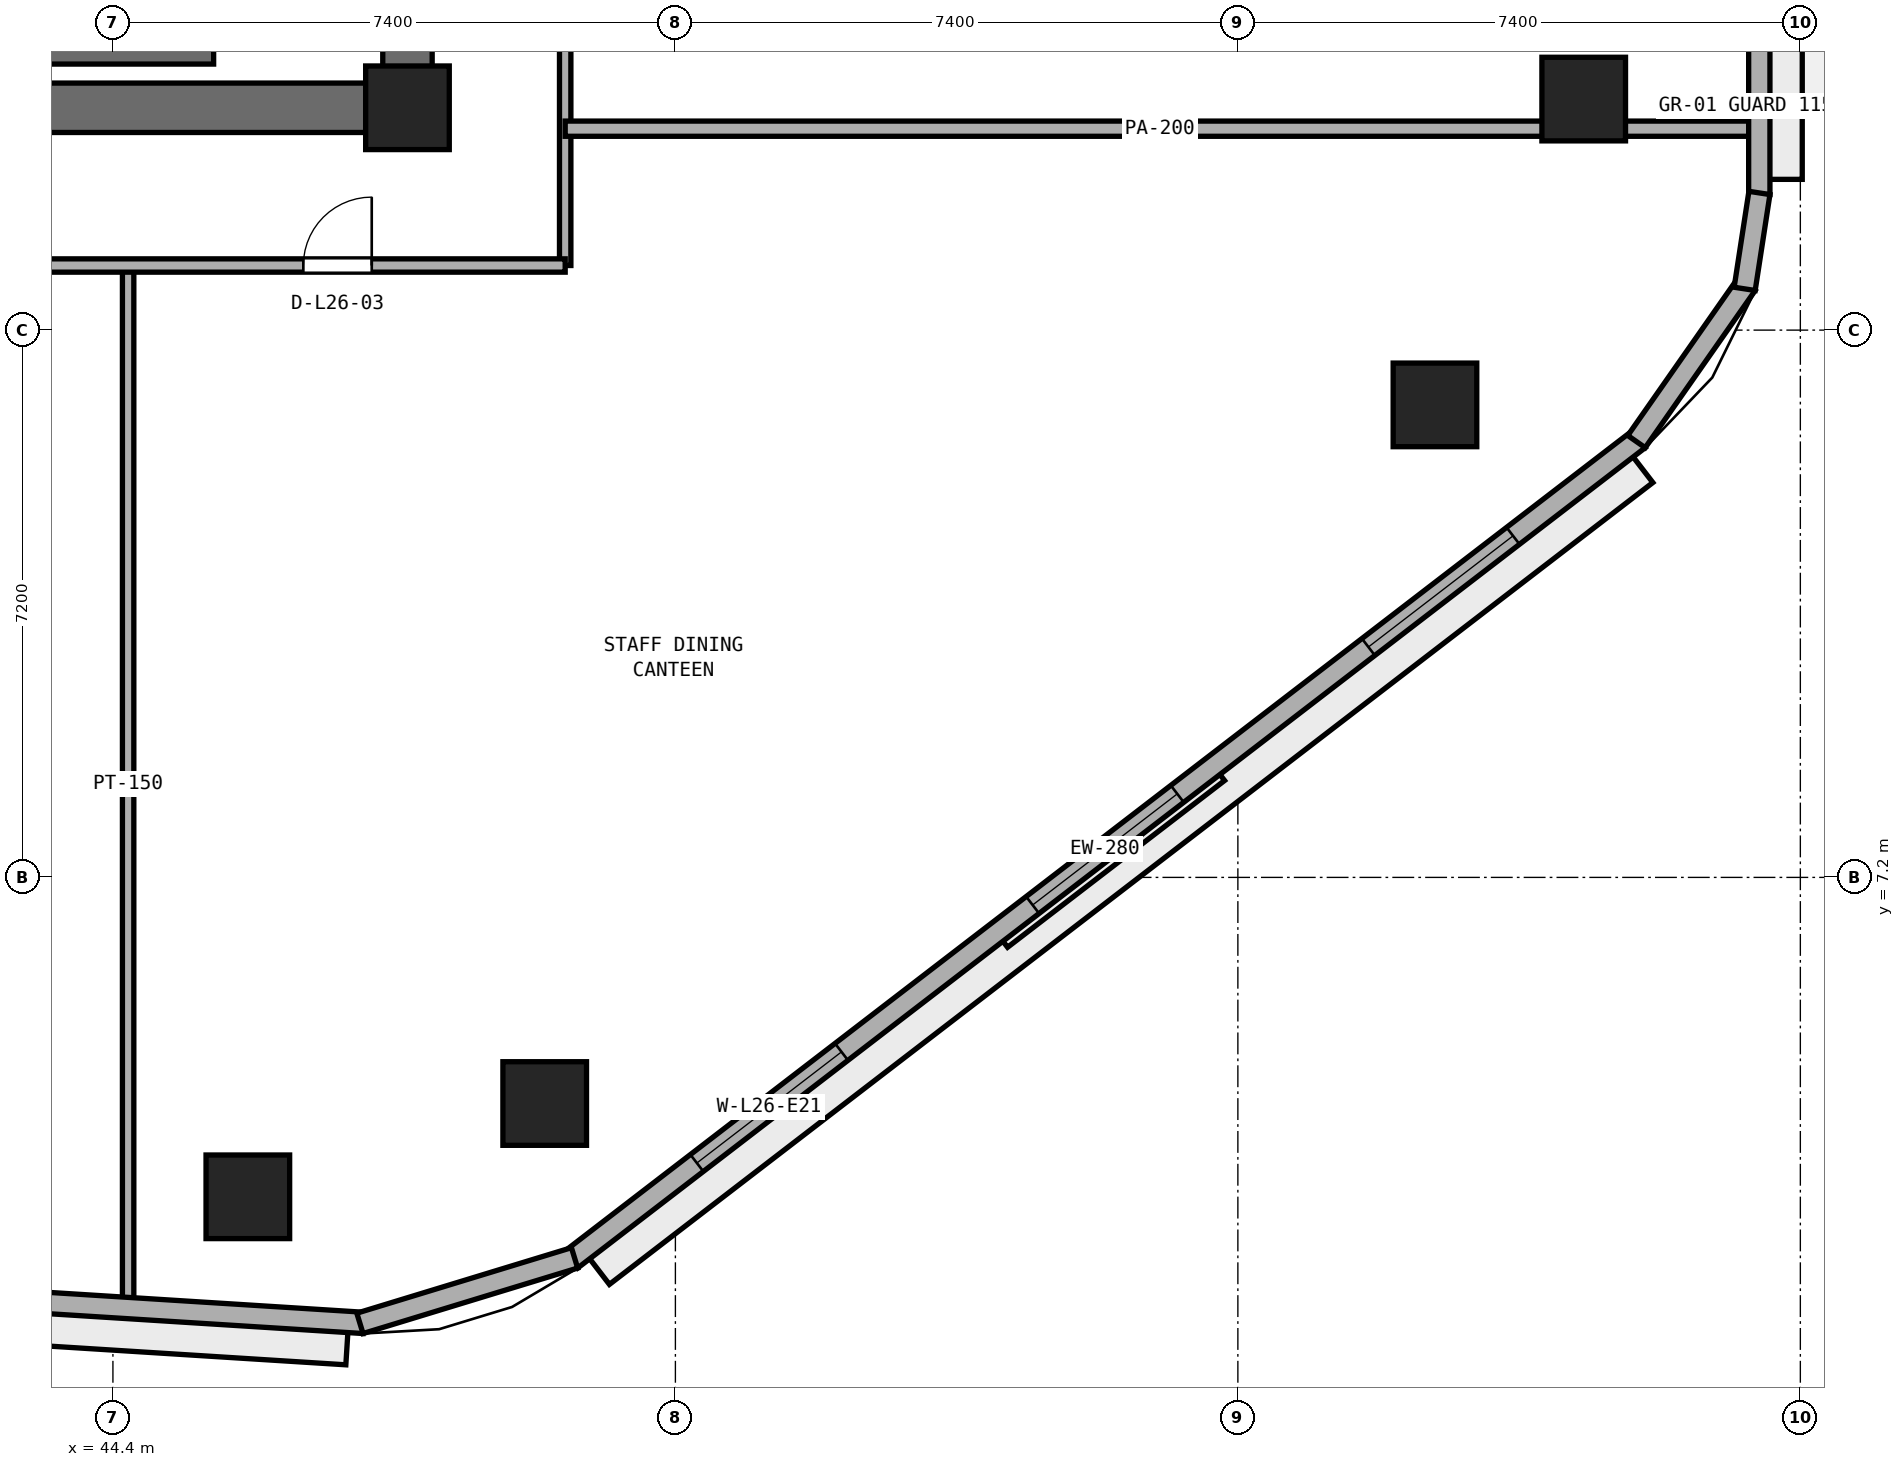
"""IFC4 building model, lengths in metres.
Left out: names, types, materials, properties, quantities, classifications, styles, units other than length and angle.
Written with IfcOpenShell. Run it as: python <this file> out.ifc"""

import sys

from ifc_helpers import new_model, si_unit, direction, frame, frame_2d, origin, origin_2d, place, context, subcontext, project, spatial, rectangle, extrude, element, fill, save


model = new_model("IFC4")
c1 = context("Model", 3, precision=1e-05, world=origin(), true_north=direction((0.0, 1.0)))
c2 = subcontext(c1, "Body", "Model", "MODEL_VIEW")
j1 = project(units=[si_unit("LENGTHUNIT", "METRE"), si_unit("PLANEANGLEUNIT", "RADIAN")], contexts=[c1])
p1 = place(None, origin())
s1 = spatial("IfcSite", under=j1, at=p1, CompositionType="ELEMENT")
p2 = place(p1, origin())
s2 = spatial("IfcBuilding", under=s1, at=p2, CompositionType="ELEMENT")
p3 = place(p2, frame((0.0, 0.0, 104.8)))
s3 = spatial("IfcBuildingStorey", under=s2, at=p3, CompositionType="ELEMENT", Elevation=104.8)
p4 = place(p3, frame((25.4, 17.325, 0.0), z_axis=(0.0, 0.0, 1.0), x_axis=(1.0, 0.0, 0.0)))
e1 = element("IfcWall", 1, at=p4, inside=s3, PredefinedType="SHEAR", context=c2, shape_type="SweptSolid", body=[
    extrude(rectangle(XDim=23.2, YDim=0.65, at=frame_2d((11.6, 0.0))), origin(), (0.0, 0.0, 1.0), 3.525),
])
p5 = place(p3, frame((48.275, 17.65, 0.0), z_axis=(0.0, 0.0, 1.0), x_axis=(0.0, 1.0, 0.0)))
e2 = element("IfcWall", 2, at=p5, inside=s3, PredefinedType="SHEAR", context=c2, shape_type="SweptSolid", body=[
    extrude(rectangle(XDim=15.1, YDim=0.65, at=frame_2d((7.55, 0.0))), origin(), (0.0, 0.0, 1.0), 3.525),
])
p6 = place(p5, frame((5.65, 0.0, 0.0)))
e3 = element("IfcOpeningElement", 3, at=p6, cuts=e2, PredefinedType="OPENING", context=c2, shape_type="SweptSolid", body=[
    extrude(rectangle(XDim=1.5, YDim=2.15, at=frame_2d((0.75, 1.075))), frame((0.0, 0.335, 0.0), z_axis=(0.0, -1.0, 0.0), x_axis=(1.0, 0.0, 0.0)), (0.0, 0.0, 1.0), 0.67),
])
p7 = place(p3, frame((48.275, 17.325, 0.0), z_axis=(0.0, 0.0, 1.0), x_axis=(1.0, 0.0, 0.0)))
e4 = element("IfcColumn", 4, at=p7, inside=s3, PredefinedType="PILASTER", context=c2, shape_type="SweptSolid", body=[
    extrude(rectangle(XDim=1.1, YDim=1.1, at=origin_2d()), origin(), (0.0, 0.0, 1.0), 3.8),
])
for number, where, z_axis, x_axis in (
    (5, (46.175, 2.998, 0.0), (0.0, 0.0, 1.0), (1.0, 0.0, 0.0)),
    (6, (50.081, 4.225, 0.0), (0.0, 0.0, 1.0), (1.0, 0.0, 0.0)),
    (7, (61.793, 13.416, 0.0), (0.0, 0.0, 1.0), (1.0, 0.0, 0.0)),
    (8, (63.75, 17.44, 0.0), (0.0, 0.0, 1.0), (1.0, 0.0, 0.0)),
):
    element("IfcColumn", number, at=place(p3, frame(where, z_axis=z_axis, x_axis=x_axis)), inside=s3, PredefinedType="COLUMN", context=c2, shape_type="SweptSolid", body=[
        extrude(rectangle(XDim=1.1, YDim=1.1, at=origin_2d()), origin(), (0.0, 0.0, 1.0), 3.8),
    ])
p8 = place(p3, frame((38.425, 18.025, 0.0), z_axis=(0.0, 0.0, 1.0), x_axis=(1.0, 0.0, 0.0)))
e9 = element("IfcWall", 9, at=p8, inside=s3, PredefinedType="SHEAR", context=c2, shape_type="SweptSolid", body=[
    extrude(rectangle(XDim=7.3, YDim=0.25, at=frame_2d((3.65, 0.0))), origin(), (0.0, 0.0, 1.0), 3.525),
])
p9 = place(p3, frame((50.35, 15.25, 0.0), z_axis=(0.0, 0.0, 1.0), x_axis=(0.0, 1.0, 0.0)))
e10 = element("IfcWall", 10, at=p9, inside=s3, PredefinedType="PARTITIONING", context=c2, shape_type="SweptSolid", body=[
    extrude(rectangle(XDim=19.9, YDim=0.15, at=frame_2d((9.95, 0.0))), origin(), (0.0, 0.0, 1.0), 3.525),
])
p10 = place(p9, frame((7.825, 0.0, 0.0)))
e11 = element("IfcOpeningElement", 11, at=p10, cuts=e10, PredefinedType="OPENING", context=c2, shape_type="SweptSolid", body=[
    extrude(rectangle(XDim=0.9, YDim=2.1, at=frame_2d((0.45, 1.05))), frame((0.0, 0.085, 0.0), z_axis=(0.0, -1.0, 0.0), x_axis=(1.0, 0.0, 0.0)), (0.0, 0.0, 1.0), 0.17),
])
p11 = place(p9, frame((15.925, 0.0, 0.0)))
e12 = element("IfcOpeningElement", 12, at=p11, cuts=e10, PredefinedType="OPENING", context=c2, shape_type="SweptSolid", body=[
    extrude(rectangle(XDim=1.0, YDim=2.12, at=frame_2d((0.5, 1.06))), frame((0.0, 0.085, 0.0), z_axis=(0.0, -1.0, 0.0), x_axis=(1.0, 0.0, 0.0)), (0.0, 0.0, 1.0), 0.17),
])
p12 = place(p3, frame((44.6, 1.599, 0.0), z_axis=(0.0, 0.0, 1.0), x_axis=(0.0, 1.0, 0.0)))
e13 = element("IfcWall", 13, at=p12, inside=s3, PredefinedType="PARTITIONING", context=c2, shape_type="SweptSolid", body=[
    extrude(rectangle(XDim=13.651, YDim=0.15, at=frame_2d((6.825, 0.0))), origin(), (0.0, 0.0, 1.0), 3.525),
])
p13 = place(p3, frame((23.65, 15.25, 0.0), z_axis=(0.0, 0.0, 1.0), x_axis=(1.0, 0.0, 0.0)))
e14 = element("IfcWall", 14, at=p13, inside=s3, PredefinedType="PARTITIONING", context=c2, shape_type="SweptSolid", body=[
    extrude(rectangle(XDim=26.7, YDim=0.175, at=frame_2d((13.35, 0.0))), origin(), (0.0, 0.0, 1.0), 3.525),
])
p14 = place(p13, frame((10.145, 0.0, 0.0)))
e15 = element("IfcOpeningElement", 15, at=p14, cuts=e14, PredefinedType="OPENING", context=c2, shape_type="SweptSolid", body=[
    extrude(rectangle(XDim=0.9, YDim=2.1, at=frame_2d((0.45, 1.05))), frame((0.0, 0.097, 0.0), z_axis=(0.0, -1.0, 0.0), x_axis=(1.0, 0.0, 0.0)), (0.0, 0.0, 1.0), 0.195),
])
p15 = place(p13, frame((23.255, 0.0, 0.0)))
e16 = element("IfcOpeningElement", 16, at=p15, cuts=e14, PredefinedType="OPENING", context=c2, shape_type="SweptSolid", body=[
    extrude(rectangle(XDim=0.9, YDim=2.1, at=frame_2d((0.45, 1.05))), frame((0.0, 0.097, 0.0), z_axis=(0.0, -1.0, 0.0), x_axis=(1.0, 0.0, 0.0)), (0.0, 0.0, 1.0), 0.195),
])
p16 = place(p3, frame((50.35, 17.05, 0.0), z_axis=(0.0, 0.0, 1.0), x_axis=(1.0, 0.0, 0.0)))
e17 = element("IfcWall", 17, at=p16, inside=s3, PredefinedType="PARTITIONING", context=c2, shape_type="SweptSolid", body=[
    extrude(rectangle(XDim=15.645, YDim=0.2, at=frame_2d((7.823, 0.0))), origin(), (0.0, 0.0, 1.0), 3.525),
])
p17 = place(p3, frame((28.161, 2.571, 0.0), z_axis=(0.0, 0.0, 1.0), x_axis=(0.998017288298, -0.06294038654, 0.0)))
e18 = element("IfcWall", 18, at=p17, inside=s3, PredefinedType="STANDARD", context=c2, shape_type="SweptSolid", body=[
    extrude(rectangle(XDim=19.577, YDim=0.28, at=frame_2d((9.789, 0.0))), origin(), (0.0, 0.0, 1.0), 3.525),
])
p18 = place(p17, frame((2.396, 0.0, 0.9)))
e19 = element("IfcOpeningElement", 19, at=p18, cuts=e18, PredefinedType="OPENING", context=c2, shape_type="SweptSolid", body=[
    extrude(rectangle(XDim=2.4, YDim=1.75, at=frame_2d((1.2, 0.875))), frame((0.0, 0.15, 0.0), z_axis=(0.0, -1.0, 0.0), x_axis=(1.0, 0.0, 0.0)), (0.0, 0.0, 1.0), 0.3),
])
p19 = place(p17, frame((8.588, 0.0, 0.9)))
e20 = element("IfcOpeningElement", 20, at=p19, cuts=e18, PredefinedType="OPENING", context=c2, shape_type="SweptSolid", body=[
    extrude(rectangle(XDim=2.4, YDim=1.75, at=frame_2d((1.2, 0.875))), frame((0.0, 0.15, 0.0), z_axis=(0.0, -1.0, 0.0), x_axis=(1.0, 0.0, 0.0)), (0.0, 0.0, 1.0), 0.3),
])
p20 = place(p3, frame((50.429, 2.172, 0.0), z_axis=(0.0, 0.0, 1.0), x_axis=(0.792937466367, 0.609303023488, 0.0)))
e21 = element("IfcWall", 21, at=p20, inside=s3, PredefinedType="STANDARD", context=c2, shape_type="SweptSolid", body=[
    extrude(rectangle(XDim=17.713, YDim=0.28, at=frame_2d((8.856, 0.0))), origin(), (0.0, 0.0, 1.0), 3.525),
])
p21 = place(p20, frame((2.085, 0.0, 0.9)))
e22 = element("IfcOpeningElement", 22, at=p21, cuts=e21, PredefinedType="OPENING", context=c2, shape_type="SweptSolid", body=[
    extrude(rectangle(XDim=2.4, YDim=1.75, at=frame_2d((1.2, 0.875))), frame((0.0, 0.15, 0.0), z_axis=(0.0, -1.0, 0.0), x_axis=(1.0, 0.0, 0.0)), (0.0, 0.0, 1.0), 0.3),
])
p22 = place(p20, frame((7.656, 0.0, 0.9)))
e23 = element("IfcOpeningElement", 23, at=p22, cuts=e21, PredefinedType="OPENING", context=c2, shape_type="SweptSolid", body=[
    extrude(rectangle(XDim=2.4, YDim=1.75, at=frame_2d((1.2, 0.875))), frame((0.0, 0.15, 0.0), z_axis=(0.0, -1.0, 0.0), x_axis=(1.0, 0.0, 0.0)), (0.0, 0.0, 1.0), 0.3),
])
p23 = place(p20, frame((13.227, 0.0, 0.9)))
e24 = element("IfcOpeningElement", 24, at=p23, cuts=e21, PredefinedType="OPENING", context=c2, shape_type="SweptSolid", body=[
    extrude(rectangle(XDim=2.4, YDim=1.75, at=frame_2d((1.2, 0.875))), frame((0.0, 0.15, 0.0), z_axis=(0.0, -1.0, 0.0), x_axis=(1.0, 0.0, 0.0)), (0.0, 0.0, 1.0), 0.3),
])
p24 = place(p3, frame((66.06, 16.183, 0.0), z_axis=(0.0, 0.0, 1.0), x_axis=(0.0, 1.0, 0.0)))
e25 = element("IfcWall", 25, at=p24, inside=s3, PredefinedType="STANDARD", context=c2, shape_type="SweptSolid", body=[
    extrude(rectangle(XDim=19.331, YDim=0.28, at=frame_2d((9.666, 0.0))), origin(), (0.0, 0.0, 1.0), 3.525),
])
p25 = place(p24, frame((9.115, 0.0, 0.0)))
e26 = element("IfcOpeningElement", 26, at=p25, cuts=e25, PredefinedType="OPENING", context=c2, shape_type="SweptSolid", body=[
    extrude(rectangle(XDim=1.1, YDim=2.2, at=frame_2d((0.55, 1.1))), frame((0.0, 0.15, 0.0), z_axis=(0.0, -1.0, 0.0), x_axis=(1.0, 0.0, 0.0)), (0.0, 0.0, 1.0), 0.3),
])
p26 = place(p24, frame((2.355, 0.0, 0.9)))
e27 = element("IfcOpeningElement", 27, at=p26, cuts=e25, PredefinedType="OPENING", context=c2, shape_type="SweptSolid", body=[
    extrude(rectangle(XDim=2.4, YDim=1.75, at=frame_2d((1.2, 0.875))), frame((0.0, 0.15, 0.0), z_axis=(0.0, -1.0, 0.0), x_axis=(1.0, 0.0, 0.0)), (0.0, 0.0, 1.0), 0.3),
])
p27 = place(p24, frame((14.326, 0.0, 0.9)))
e28 = element("IfcOpeningElement", 28, at=p27, cuts=e25, PredefinedType="OPENING", context=c2, shape_type="SweptSolid", body=[
    extrude(rectangle(XDim=2.4, YDim=1.75, at=frame_2d((1.2, 0.875))), frame((0.0, 0.15, 0.0), z_axis=(0.0, -1.0, 0.0), x_axis=(1.0, 0.0, 0.0)), (0.0, 0.0, 1.0), 0.3),
])
p28 = place(p3, frame((47.65, 1.333, 0.0), z_axis=(0.0, 0.0, 1.0), x_axis=(0.956461287977, 0.291859220516, 0.0)))
e29 = element("IfcWall", 29, at=p28, inside=s3, PredefinedType="STANDARD", context=c2, shape_type="SweptSolid", body=[
    extrude(rectangle(XDim=2.952, YDim=0.28, at=frame_2d((1.476, 0.0))), origin(), (0.0, 0.0, 1.0), 3.525),
])
p29 = place(p3, frame((64.444, 12.933, 0.0), z_axis=(0.0, 0.0, 1.0), x_axis=(0.573176686443, 0.819431806875, 0.0)))
e30 = element("IfcWall", 30, at=p29, inside=s3, PredefinedType="STANDARD", context=c2, shape_type="SweptSolid", body=[
    extrude(rectangle(XDim=2.524, YDim=0.28, at=frame_2d((1.262, 0.0))), origin(), (0.0, 0.0, 1.0), 3.525),
])
p30 = place(p3, frame((65.867, 14.943, 0.0), z_axis=(0.0, 0.0, 1.0), x_axis=(0.152014078361, 0.988378328364, 0.0)))
e31 = element("IfcWall", 31, at=p30, inside=s3, PredefinedType="STANDARD", context=c2, shape_type="SweptSolid", body=[
    extrude(rectangle(XDim=1.277, YDim=0.28, at=frame_2d((0.638, 0.0))), origin(), (0.0, 0.0, 1.0), 3.525),
])
p31 = place(p15, origin())
e32 = element("IfcDoor", 32, at=p31, inside=s3, OperationType="SINGLE_SWING_RIGHT", PredefinedType="DOOR", context=c2, shape_type="SweptSolid", body=[
    extrude(rectangle(XDim=0.9, YDim=2.1, at=frame_2d((0.45, 1.05))), frame((0.0, 0.025, 0.0), z_axis=(0.0, -1.0, 0.0), x_axis=(1.0, 0.0, 0.0)), (0.0, 0.0, 1.0), 0.05),
])
fill(e16, e32)
p32 = place(p21, origin())
e33 = element("IfcWindow", 33, at=p32, inside=s3, PartitioningType="SINGLE_PANEL", PredefinedType="WINDOW", context=c2, shape_type="SweptSolid", body=[
    extrude(rectangle(XDim=2.4, YDim=1.75, at=frame_2d((1.2, 0.875))), frame((0.0, 0.03, 0.0), z_axis=(0.0, -1.0, 0.0), x_axis=(1.0, 0.0, 0.0)), (0.0, 0.0, 1.0), 0.06),
])
fill(e22, e33)
p33 = place(p22, origin())
e34 = element("IfcWindow", 34, at=p33, inside=s3, PartitioningType="SINGLE_PANEL", PredefinedType="WINDOW", context=c2, shape_type="SweptSolid", body=[
    extrude(rectangle(XDim=2.4, YDim=1.75, at=frame_2d((1.2, 0.875))), frame((0.0, 0.03, 0.0), z_axis=(0.0, -1.0, 0.0), x_axis=(1.0, 0.0, 0.0)), (0.0, 0.0, 1.0), 0.06),
])
fill(e23, e34)
p34 = place(p23, origin())
e35 = element("IfcWindow", 35, at=p34, inside=s3, PartitioningType="SINGLE_PANEL", PredefinedType="WINDOW", context=c2, shape_type="SweptSolid", body=[
    extrude(rectangle(XDim=2.4, YDim=1.75, at=frame_2d((1.2, 0.875))), frame((0.0, 0.03, 0.0), z_axis=(0.0, -1.0, 0.0), x_axis=(1.0, 0.0, 0.0)), (0.0, 0.0, 1.0), 0.06),
])
fill(e24, e35)
save(model, sys.argv[1])
